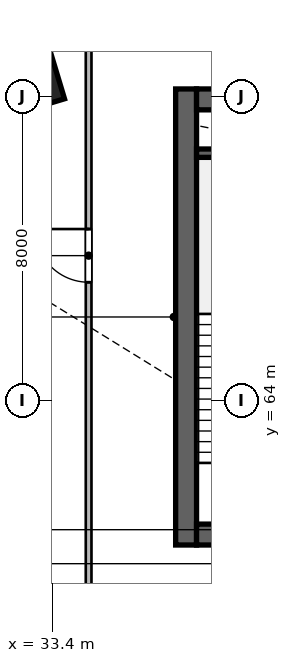
"""IFC4 building model, lengths in metres.
Left out: names, types, materials, properties, quantities, classifications, styles, units other than length and angle.
Written with IfcOpenShell. Run it as: python <this file> out.ifc"""

import sys

from ifc_helpers import new_model, si_unit, direction, frame, frame_2d, origin, origin_2d, place, context, subcontext, project, spatial, rectangle, extrude, source, transform, mapped, element, fill, save


model = new_model("IFC4")
c1 = context("Model", 3, precision=1e-05, world=origin(), true_north=direction((0.0, 1.0)))
c2 = subcontext(c1, "Body", "Model", "MODEL_VIEW")
j1 = project(units=[si_unit("LENGTHUNIT", "METRE"), si_unit("PLANEANGLEUNIT", "RADIAN")], contexts=[c1])
p1 = place(None, origin())
s1 = spatial("IfcSite", under=j1, at=p1, CompositionType="ELEMENT")
p2 = place(p1, origin())
s2 = spatial("IfcBuilding", under=s1, at=p2, CompositionType="ELEMENT")
p3 = place(p2, frame((0.0, 0.0, 30.0)))
s3 = spatial("IfcBuildingStorey", under=s2, at=p3, CompositionType="ELEMENT", Elevation=30.0)
m1 = source(origin(), c2, "Body", "SweptSolid", [
    extrude(rectangle(XDim=12.0, YDim=0.55, at=frame_2d((6.0, 0.0))), origin(), (0.0, 0.0, 1.0), 5.4),
])
p4 = place(p3, frame((36.925, 60.2, 0.0), z_axis=(0.0, 0.0, 1.0), x_axis=(0.0, 1.0, 0.0)))
e1 = element("IfcWall", 1, at=p4, inside=s3, PredefinedType="SHEAR", context=c2, shape_type="MappedRepresentation", body=[
    mapped(m1, transform((0.0, 0.0, 0.0), scale=1.0)),
])
m2 = source(origin(), c2, "Body", "SweptSolid", [
    extrude(rectangle(XDim=21.6, YDim=0.55, at=frame_2d((10.8, 0.0))), origin(), (0.0, 0.0, 1.0), 5.4),
])
p5 = place(p3, frame((37.2, 60.475, 0.0), z_axis=(0.0, 0.0, 1.0), x_axis=(1.0, 0.0, 0.0)))
e2 = element("IfcWall", 2, at=p5, inside=s3, PredefinedType="SHEAR", context=c2, shape_type="MappedRepresentation", body=[
    mapped(m2, transform((0.0, 0.0, 0.0), scale=1.0)),
])
p6 = place(p5, frame((1.1, 0.0, 0.0)))
e3 = element("IfcOpeningElement", 3, at=p6, cuts=e2, PredefinedType="OPENING", context=c2, shape_type="SweptSolid", body=[
    extrude(rectangle(XDim=1.15, YDim=2.15, at=frame_2d((0.575, 1.075))), frame((0.0, 0.285, 0.0), z_axis=(0.0, -1.0, 0.0), x_axis=(1.0, 0.0, 0.0)), (0.0, 0.0, 1.0), 0.57),
])
p7 = place(p5, frame((19.5, 0.0, 0.0)))
e4 = element("IfcOpeningElement", 4, at=p7, cuts=e2, PredefinedType="OPENING", context=c2, shape_type="SweptSolid", body=[
    extrude(rectangle(XDim=0.9, YDim=2.1, at=frame_2d((0.45, 1.05))), frame((0.0, 0.285, 0.0), z_axis=(0.0, -1.0, 0.0), x_axis=(1.0, 0.0, 0.0)), (0.0, 0.0, 1.0), 0.57),
])
p8 = place(p5, frame((12.02, 0.0, 0.0)))
e5 = element("IfcOpeningElement", 5, at=p8, cuts=e2, PredefinedType="OPENING", context=c2, shape_type="SweptSolid", body=[
    extrude(rectangle(XDim=1.6, YDim=2.15, at=frame_2d((0.8, 1.075))), frame((0.0, 0.285, 0.0), z_axis=(0.0, -1.0, 0.0), x_axis=(1.0, 0.0, 0.0)), (0.0, 0.0, 1.0), 0.57),
])
p9 = place(p3, frame((37.2, 71.925, 0.0), z_axis=(0.0, 0.0, 1.0), x_axis=(1.0, 0.0, 0.0)))
e6 = element("IfcWall", 6, at=p9, inside=s3, PredefinedType="SHEAR", context=c2, shape_type="MappedRepresentation", body=[
    mapped(m2, transform((0.0, 0.0, 0.0), scale=1.0)),
])
p10 = place(p9, frame((1.2, 0.0, 0.0)))
e7 = element("IfcOpeningElement", 7, at=p10, cuts=e6, PredefinedType="OPENING", context=c2, shape_type="SweptSolid", body=[
    extrude(rectangle(XDim=0.9, YDim=2.1, at=frame_2d((0.45, 1.05))), frame((0.0, 0.285, 0.0), z_axis=(0.0, -1.0, 0.0), x_axis=(1.0, 0.0, 0.0)), (0.0, 0.0, 1.0), 0.57),
])
p11 = place(p9, frame((14.7, 0.0, 0.0)))
e8 = element("IfcOpeningElement", 8, at=p11, cuts=e6, PredefinedType="OPENING", context=c2, shape_type="SweptSolid", body=[
    extrude(rectangle(XDim=1.2, YDim=2.15, at=frame_2d((0.6, 1.075))), frame((0.0, 0.285, 0.0), z_axis=(0.0, -1.0, 0.0), x_axis=(1.0, 0.0, 0.0)), (0.0, 0.0, 1.0), 0.57),
])
p12 = place(p9, frame((4.15, 0.0, 0.0)))
e9 = element("IfcOpeningElement", 9, at=p12, cuts=e6, PredefinedType="OPENING", context=c2, shape_type="SweptSolid", body=[
    extrude(rectangle(XDim=1.3, YDim=2.15, at=frame_2d((0.65, 1.075))), frame((0.0, 0.285, 0.0), z_axis=(0.0, -1.0, 0.0), x_axis=(1.0, 0.0, 0.0)), (0.0, 0.0, 1.0), 0.57),
])
p13 = place(p9, frame((7.25, 0.0, 0.0)))
e10 = element("IfcOpeningElement", 10, at=p13, cuts=e6, PredefinedType="OPENING", context=c2, shape_type="SweptSolid", body=[
    extrude(rectangle(XDim=0.9, YDim=2.1, at=frame_2d((0.45, 1.05))), frame((0.0, 0.285, 0.0), z_axis=(0.0, -1.0, 0.0), x_axis=(1.0, 0.0, 0.0)), (0.0, 0.0, 1.0), 0.57),
])
m3 = source(origin(), c2, "Body", "SweptSolid", [
    extrude(rectangle(XDim=3.27, YDim=0.22, at=frame_2d((1.635, 0.0))), origin(), (0.0, 0.0, 1.0), 5.4),
])
p14 = place(p3, frame((37.2, 70.51, 0.0), z_axis=(0.0, 0.0, 1.0), x_axis=(1.0, 0.0, 0.0)))
e11 = element("IfcWall", 11, at=p14, inside=s3, PredefinedType="SHEAR", context=c2, shape_type="MappedRepresentation", body=[
    mapped(m3, transform((0.0, 0.0, 0.0), scale=1.0)),
])
m4 = source(origin(), c2, "Body", "SweptSolid", [
    extrude(rectangle(XDim=1.5, YDim=1.5, at=origin_2d()), origin(), (0.0, 0.0, 1.0), 5.4),
])
p15 = place(p3, frame((32.791, 72.442, 0.0), z_axis=(0.0, 0.0, 1.0), x_axis=(-0.288697611798, 0.957420330337, 0.0)))
e12 = element("IfcColumn", 12, at=p15, inside=s3, PredefinedType="COLUMN", context=c2, shape_type="MappedRepresentation", body=[
    mapped(m4, transform((0.0, 0.0, 0.0), scale=1.0)),
])
m5 = source(origin(), c2, "Body", "SweptSolid", [
    extrude(rectangle(XDim=19.708, YDim=0.15, at=frame_2d((9.854, 0.0))), origin(), (0.0, 0.0, 1.0), 5.16),
])
p16 = place(p3, frame((34.36, 57.96, 0.0), z_axis=(0.0, 0.0, 1.0), x_axis=(0.0, 1.0, 0.0)))
e13 = element("IfcWall", 13, at=p16, inside=s3, PredefinedType="PARTITIONING", context=c2, shape_type="MappedRepresentation", body=[
    mapped(m5, transform((0.0, 0.0, 0.0), scale=1.0)),
])
p17 = place(p16, frame((9.154, 0.0, 0.0)))
e14 = element("IfcOpeningElement", 14, at=p17, cuts=e13, PredefinedType="OPENING", context=c2, shape_type="SweptSolid", body=[
    extrude(rectangle(XDim=1.4, YDim=2.15, at=frame_2d((0.7, 1.075))), frame((0.0, 0.085, 0.0), z_axis=(0.0, -1.0, 0.0), x_axis=(1.0, 0.0, 0.0)), (0.0, 0.0, 1.0), 0.17),
])
m6 = source(origin(), c2, "Body", "SweptSolid", [
    extrude(rectangle(XDim=1.4, YDim=2.15, at=frame_2d((0.7, 1.075))), frame((0.0, 0.025, 0.0), z_axis=(0.0, -1.0, 0.0), x_axis=(1.0, 0.0, 0.0)), (0.0, 0.0, 1.0), 0.05),
])
p18 = place(p17, origin())
e15 = element("IfcDoor", 15, at=p18, inside=s3, OperationType="SINGLE_SWING_RIGHT", PredefinedType="DOOR", context=c2, shape_type="MappedRepresentation", body=[
    mapped(m6, transform((0.0, 0.0, 0.0), scale=1.0)),
])
fill(e14, e15)
save(model, sys.argv[1])
